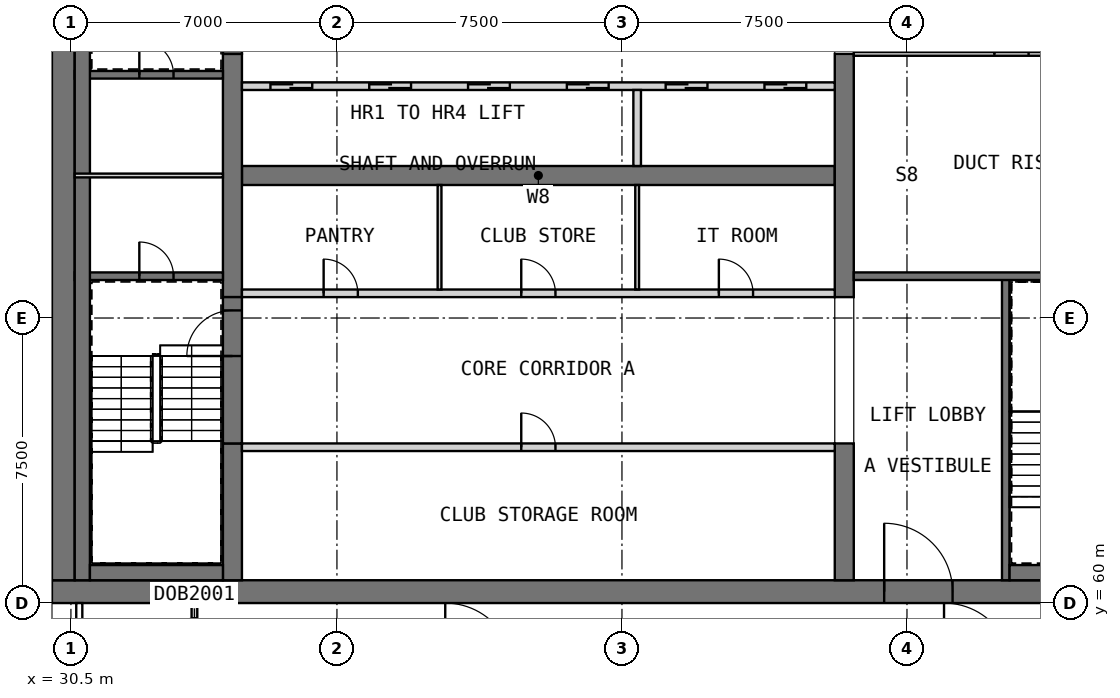
"""IFC4 building model, lengths in metres.
Left out: names, types, materials, properties, quantities, classifications, styles, units other than length and angle.
Written with IfcOpenShell. Run it as: python <this file> out.ifc"""

import sys

from ifc_helpers import new_model, si_unit, direction, frame, frame_2d, origin, place, context, subcontext, project, spatial, rectangle, extrude, element, fill, save


model = new_model("IFC4")
c1 = context("Model", 3, precision=1e-05, world=origin(), true_north=direction((0.0, 1.0)))
c2 = subcontext(c1, "Body", "Model", "MODEL_VIEW")
j1 = project(units=[si_unit("LENGTHUNIT", "METRE"), si_unit("PLANEANGLEUNIT", "RADIAN")], contexts=[c1])
p1 = place(None, origin())
s1 = spatial("IfcSite", under=j1, at=p1, CompositionType="ELEMENT")
p2 = place(p1, origin())
s2 = spatial("IfcBuilding", under=s1, at=p2, CompositionType="ELEMENT")
p3 = place(p2, frame((0.0, 0.0, 308.7)))
s3 = spatial("IfcBuildingStorey", under=s2, at=p3, CompositionType="ELEMENT", Elevation=308.7)
p4 = place(p3, frame((30.0, 60.3, 0.0), z_axis=(0.0, 0.0, 1.0), x_axis=(1.0, 0.0, 0.0)))
e1 = element("IfcWall", 1, at=p4, inside=s3, PredefinedType="SHEAR", context=c2, shape_type="SweptSolid", body=[
    extrude(rectangle(XDim=30.0, YDim=0.6, at=frame_2d((15.0, 0.0))), origin(), (0.0, 0.0, 1.0), 6.0),
])
p5 = place(p4, frame((21.9, 0.0, 0.0)))
e2 = element("IfcOpeningElement", 2, at=p5, cuts=e1, PredefinedType="OPENING", context=c2, shape_type="SweptSolid", body=[
    extrude(rectangle(XDim=1.8, YDim=2.1, at=frame_2d((0.9, 1.05))), frame((0.0, 0.31, 0.0), z_axis=(0.0, -1.0, 0.0), x_axis=(1.0, 0.0, 0.0)), (0.0, 0.0, 1.0), 0.62),
])
p6 = place(p4, frame((26.5, 0.0, 0.0)))
e3 = element("IfcOpeningElement", 3, at=p6, cuts=e1, PredefinedType="OPENING", context=c2, shape_type="SweptSolid", body=[
    extrude(rectangle(XDim=1.2, YDim=2.1, at=frame_2d((0.6, 1.05))), frame((0.0, 0.31, 0.0), z_axis=(0.0, -1.0, 0.0), x_axis=(1.0, 0.0, 0.0)), (0.0, 0.0, 1.0), 0.62),
])
p7 = place(p3, frame((30.3, 60.6, 0.0), z_axis=(0.0, 0.0, 1.0), x_axis=(0.0, 1.0, 0.0)))
e4 = element("IfcWall", 4, at=p7, inside=s3, PredefinedType="SHEAR", context=c2, shape_type="SweptSolid", body=[
    extrude(rectangle(XDim=21.3, YDim=0.6, at=frame_2d((10.65, 0.0))), origin(), (0.0, 0.0, 1.0), 6.0),
])
p8 = place(p3, frame((35.0, 71.25, 0.0), z_axis=(0.0, 0.0, 1.0), x_axis=(1.0, 0.0, 0.0)))
e5 = element("IfcWall", 5, at=p8, inside=s3, PredefinedType="SHEAR", context=c2, shape_type="SweptSolid", body=[
    extrude(rectangle(XDim=15.6, YDim=0.5, at=frame_2d((7.8, 0.0))), origin(), (0.0, 0.0, 1.0), 6.0),
])
p9 = place(p3, frame((34.75, 60.6, 0.0), z_axis=(0.0, 0.0, 1.0), x_axis=(0.0, 1.0, 0.0)))
e6 = element("IfcWall", 6, at=p9, inside=s3, PredefinedType="SHEAR", context=c2, shape_type="SweptSolid", body=[
    extrude(rectangle(XDim=3.6, YDim=0.5, at=frame_2d((1.8, 0.0))), origin(), (0.0, 0.0, 1.0), 6.0),
])
p10 = place(p3, frame((34.75, 68.05, 0.0), z_axis=(0.0, 0.0, 1.0), x_axis=(0.0, 1.0, 0.0)))
e7 = element("IfcWall", 7, at=p10, inside=s3, PredefinedType="SHEAR", context=c2, shape_type="SweptSolid", body=[
    extrude(rectangle(XDim=6.4, YDim=0.5, at=frame_2d((3.2, 0.0))), origin(), (0.0, 0.0, 1.0), 6.0),
])
p11 = place(p3, frame((50.85, 60.6, 0.0), z_axis=(0.0, 0.0, 1.0), x_axis=(0.0, 1.0, 0.0)))
e8 = element("IfcWall", 8, at=p11, inside=s3, PredefinedType="SHEAR", context=c2, shape_type="SweptSolid", body=[
    extrude(rectangle(XDim=3.6, YDim=0.5, at=frame_2d((1.8, 0.0))), origin(), (0.0, 0.0, 1.0), 6.0),
])
p12 = place(p3, frame((50.85, 68.05, 0.0), z_axis=(0.0, 0.0, 1.0), x_axis=(0.0, 1.0, 0.0)))
e9 = element("IfcWall", 9, at=p12, inside=s3, PredefinedType="SHEAR", context=c2, shape_type="SweptSolid", body=[
    extrude(rectangle(XDim=6.4, YDim=0.5, at=frame_2d((3.2, 0.0))), origin(), (0.0, 0.0, 1.0), 6.0),
])
p13 = place(p3, frame((35.0, 64.1, 0.0), z_axis=(0.0, 0.0, 1.0), x_axis=(1.0, 0.0, 0.0)))
e10 = element("IfcWall", 10, at=p13, inside=s3, PredefinedType="PARTITIONING", context=c2, shape_type="SweptSolid", body=[
    extrude(rectangle(XDim=15.6, YDim=0.2, at=frame_2d((7.8, 0.0))), origin(), (0.0, 0.0, 1.0), 5.59),
])
p14 = place(p13, frame((7.35, 0.0, 0.0)))
e11 = element("IfcOpeningElement", 11, at=p14, cuts=e10, PredefinedType="OPENING", context=c2, shape_type="SweptSolid", body=[
    extrude(rectangle(XDim=0.9, YDim=2.1, at=frame_2d((0.45, 1.05))), frame((0.0, 0.11, 0.0), z_axis=(0.0, -1.0, 0.0), x_axis=(1.0, 0.0, 0.0)), (0.0, 0.0, 1.0), 0.22),
])
p15 = place(p3, frame((35.0, 68.15, 0.0), z_axis=(0.0, 0.0, 1.0), x_axis=(1.0, 0.0, 0.0)))
e12 = element("IfcWall", 12, at=p15, inside=s3, PredefinedType="PARTITIONING", context=c2, shape_type="SweptSolid", body=[
    extrude(rectangle(XDim=15.6, YDim=0.2, at=frame_2d((7.8, 0.0))), origin(), (0.0, 0.0, 1.0), 5.59),
])
p16 = place(p15, frame((2.15, 0.0, 0.0)))
e13 = element("IfcOpeningElement", 13, at=p16, cuts=e12, PredefinedType="OPENING", context=c2, shape_type="SweptSolid", body=[
    extrude(rectangle(XDim=0.9, YDim=2.1, at=frame_2d((0.45, 1.05))), frame((0.0, 0.11, 0.0), z_axis=(0.0, -1.0, 0.0), x_axis=(1.0, 0.0, 0.0)), (0.0, 0.0, 1.0), 0.22),
])
p17 = place(p15, frame((7.35, 0.0, 0.0)))
e14 = element("IfcOpeningElement", 14, at=p17, cuts=e12, PredefinedType="OPENING", context=c2, shape_type="SweptSolid", body=[
    extrude(rectangle(XDim=0.9, YDim=2.1, at=frame_2d((0.45, 1.05))), frame((0.0, 0.11, 0.0), z_axis=(0.0, -1.0, 0.0), x_axis=(1.0, 0.0, 0.0)), (0.0, 0.0, 1.0), 0.22),
])
p18 = place(p15, frame((12.55, 0.0, 0.0)))
e15 = element("IfcOpeningElement", 15, at=p18, cuts=e12, PredefinedType="OPENING", context=c2, shape_type="SweptSolid", body=[
    extrude(rectangle(XDim=0.9, YDim=2.1, at=frame_2d((0.45, 1.05))), frame((0.0, 0.11, 0.0), z_axis=(0.0, -1.0, 0.0), x_axis=(1.0, 0.0, 0.0)), (0.0, 0.0, 1.0), 0.22),
])
for number, where, z_axis, x_axis in (
    (16, (40.2, 68.25, 0.0), (0.0, 0.0, 1.0), (0.0, 1.0, 0.0)),
    (17, (45.4, 68.25, 0.0), (0.0, 0.0, 1.0), (0.0, 1.0, 0.0)),
):
    element("IfcWall", number, at=place(p3, frame(where, z_axis=z_axis, x_axis=x_axis)), inside=s3, PredefinedType="PARTITIONING", context=c2, shape_type="SweptSolid", body=[
        extrude(rectangle(XDim=2.75, YDim=0.1, at=frame_2d((1.375, 0.0))), origin(), (0.0, 0.0, 1.0), 5.59),
    ])
p19 = place(p3, frame((35.0, 73.6, 0.0), z_axis=(0.0, 0.0, 1.0), x_axis=(1.0, 0.0, 0.0)))
e18 = element("IfcWall", 18, at=p19, inside=s3, PredefinedType="SOLIDWALL", context=c2, shape_type="SweptSolid", body=[
    extrude(rectangle(XDim=15.6, YDim=0.2, at=frame_2d((7.8, 0.0))), origin(), (0.0, 0.0, 1.0), 6.0),
])
p20 = place(p19, frame((0.75, 0.0, 0.0)))
e19 = element("IfcOpeningElement", 19, at=p20, cuts=e18, PredefinedType="OPENING", context=c2, shape_type="SweptSolid", body=[
    extrude(rectangle(XDim=1.1, YDim=2.1, at=frame_2d((0.55, 1.05))), frame((0.0, 0.11, 0.0), z_axis=(0.0, -1.0, 0.0), x_axis=(1.0, 0.0, 0.0)), (0.0, 0.0, 1.0), 0.22),
])
p21 = place(p19, frame((3.35, 0.0, 0.0)))
e20 = element("IfcOpeningElement", 20, at=p21, cuts=e18, PredefinedType="OPENING", context=c2, shape_type="SweptSolid", body=[
    extrude(rectangle(XDim=1.1, YDim=2.1, at=frame_2d((0.55, 1.05))), frame((0.0, 0.11, 0.0), z_axis=(0.0, -1.0, 0.0), x_axis=(1.0, 0.0, 0.0)), (0.0, 0.0, 1.0), 0.22),
])
p22 = place(p19, frame((5.95, 0.0, 0.0)))
e21 = element("IfcOpeningElement", 21, at=p22, cuts=e18, PredefinedType="OPENING", context=c2, shape_type="SweptSolid", body=[
    extrude(rectangle(XDim=1.1, YDim=2.1, at=frame_2d((0.55, 1.05))), frame((0.0, 0.11, 0.0), z_axis=(0.0, -1.0, 0.0), x_axis=(1.0, 0.0, 0.0)), (0.0, 0.0, 1.0), 0.22),
])
p23 = place(p19, frame((8.55, 0.0, 0.0)))
e22 = element("IfcOpeningElement", 22, at=p23, cuts=e18, PredefinedType="OPENING", context=c2, shape_type="SweptSolid", body=[
    extrude(rectangle(XDim=1.1, YDim=2.1, at=frame_2d((0.55, 1.05))), frame((0.0, 0.11, 0.0), z_axis=(0.0, -1.0, 0.0), x_axis=(1.0, 0.0, 0.0)), (0.0, 0.0, 1.0), 0.22),
])
p24 = place(p19, frame((11.15, 0.0, 0.0)))
e23 = element("IfcOpeningElement", 23, at=p24, cuts=e18, PredefinedType="OPENING", context=c2, shape_type="SweptSolid", body=[
    extrude(rectangle(XDim=1.1, YDim=2.1, at=frame_2d((0.55, 1.05))), frame((0.0, 0.11, 0.0), z_axis=(0.0, -1.0, 0.0), x_axis=(1.0, 0.0, 0.0)), (0.0, 0.0, 1.0), 0.22),
])
p25 = place(p19, frame((13.75, 0.0, 0.0)))
e24 = element("IfcOpeningElement", 24, at=p25, cuts=e18, PredefinedType="OPENING", context=c2, shape_type="SweptSolid", body=[
    extrude(rectangle(XDim=1.1, YDim=2.1, at=frame_2d((0.55, 1.05))), frame((0.0, 0.11, 0.0), z_axis=(0.0, -1.0, 0.0), x_axis=(1.0, 0.0, 0.0)), (0.0, 0.0, 1.0), 0.22),
])
p26 = place(p3, frame((45.4, 71.5, 0.0), z_axis=(0.0, 0.0, 1.0), x_axis=(0.0, 1.0, 0.0)))
e25 = element("IfcWall", 25, at=p26, inside=s3, PredefinedType="SOLIDWALL", context=c2, shape_type="SweptSolid", body=[
    extrude(rectangle(XDim=2.0, YDim=0.2, at=frame_2d((1.0, 0.0))), origin(), (0.0, 0.0, 1.0), 6.0),
])
p27 = place(p3, frame((34.75, 64.2, 0.0), z_axis=(0.0, 0.0, 1.0), x_axis=(0.0, 1.0, 0.0)))
e26 = element("IfcWall", 26, at=p27, inside=s3, PredefinedType="SOLIDWALL", context=c2, shape_type="SweptSolid", body=[
    extrude(rectangle(XDim=3.85, YDim=0.5, at=frame_2d((1.925, 0.0))), origin(), (0.0, 0.0, 1.0), 4.8),
])
p28 = place(p27, frame((2.3, 0.0, 0.0)))
e27 = element("IfcOpeningElement", 27, at=p28, cuts=e26, PredefinedType="OPENING", context=c2, shape_type="SweptSolid", body=[
    extrude(rectangle(XDim=1.2, YDim=2.1, at=frame_2d((0.6, 1.05))), frame((0.0, 0.26, 0.0), z_axis=(0.0, -1.0, 0.0), x_axis=(1.0, 0.0, 0.0)), (0.0, 0.0, 1.0), 0.52),
])
p29 = place(p3, frame((34.75, 74.45, 0.0), z_axis=(0.0, 0.0, 1.0), x_axis=(0.0, 1.0, 0.0)))
e28 = element("IfcWall", 28, at=p29, inside=s3, PredefinedType="SOLIDWALL", context=c2, shape_type="SweptSolid", body=[
    extrude(rectangle(XDim=3.85, YDim=0.5, at=frame_2d((1.925, 0.0))), origin(), (0.0, 0.0, 1.0), 4.8),
])
p30 = place(p29, frame((1.0, 0.0, 0.0)))
e29 = element("IfcOpeningElement", 29, at=p30, cuts=e28, PredefinedType="OPENING", context=c2, shape_type="SweptSolid", body=[
    extrude(rectangle(XDim=1.2, YDim=2.1, at=frame_2d((0.6, 1.05))), frame((0.0, 0.26, 0.0), z_axis=(0.0, -1.0, 0.0), x_axis=(1.0, 0.0, 0.0)), (0.0, 0.0, 1.0), 0.52),
])
p31 = place(p3, frame((30.6, 68.6, 0.0), z_axis=(0.0, 0.0, 1.0), x_axis=(1.0, 0.0, 0.0)))
e30 = element("IfcWall", 30, at=p31, inside=s3, PredefinedType="SOLIDWALL", context=c2, shape_type="SweptSolid", body=[
    extrude(rectangle(XDim=3.9, YDim=0.2, at=frame_2d((1.95, 0.0))), origin(), (0.0, 0.0, 1.0), 5.59),
])
p32 = place(p31, frame((1.7, 0.0, 0.0)))
e31 = element("IfcOpeningElement", 31, at=p32, cuts=e30, PredefinedType="OPENING", context=c2, shape_type="SweptSolid", body=[
    extrude(rectangle(XDim=0.9, YDim=2.1, at=frame_2d((0.45, 1.05))), frame((0.0, 0.11, 0.0), z_axis=(0.0, -1.0, 0.0), x_axis=(1.0, 0.0, 0.0)), (0.0, 0.0, 1.0), 0.22),
])
p33 = place(p3, frame((30.6, 73.9, 0.0), z_axis=(0.0, 0.0, 1.0), x_axis=(1.0, 0.0, 0.0)))
e32 = element("IfcWall", 32, at=p33, inside=s3, PredefinedType="SOLIDWALL", context=c2, shape_type="SweptSolid", body=[
    extrude(rectangle(XDim=3.9, YDim=0.2, at=frame_2d((1.95, 0.0))), origin(), (0.0, 0.0, 1.0), 5.59),
])
p34 = place(p33, frame((1.7, 0.0, 0.0)))
e33 = element("IfcOpeningElement", 33, at=p34, cuts=e32, PredefinedType="OPENING", context=c2, shape_type="SweptSolid", body=[
    extrude(rectangle(XDim=0.9, YDim=2.1, at=frame_2d((0.45, 1.05))), frame((0.0, 0.11, 0.0), z_axis=(0.0, -1.0, 0.0), x_axis=(1.0, 0.0, 0.0)), (0.0, 0.0, 1.0), 0.22),
])
p35 = place(p3, frame((55.1, 60.6, 0.0), z_axis=(0.0, 0.0, 1.0), x_axis=(0.0, 1.0, 0.0)))
e34 = element("IfcWall", 34, at=p35, inside=s3, PredefinedType="SOLIDWALL", context=c2, shape_type="SweptSolid", body=[
    extrude(rectangle(XDim=8.0, YDim=0.2, at=frame_2d((4.0, 0.0))), origin(), (0.0, 0.0, 1.0), 5.59),
])
p36 = place(p3, frame((51.1, 68.6, 0.0), z_axis=(0.0, 0.0, 1.0), x_axis=(1.0, 0.0, 0.0)))
e35 = element("IfcWall", 35, at=p36, inside=s3, PredefinedType="SOLIDWALL", context=c2, shape_type="SweptSolid", body=[
    extrude(rectangle(XDim=8.3, YDim=0.2, at=frame_2d((4.15, 0.0))), origin(), (0.0, 0.0, 1.0), 5.59),
])
p37 = place(p3, frame((30.8, 60.6, 0.0), z_axis=(0.0, 0.0, 1.0), x_axis=(0.0, 1.0, 0.0)))
e36 = element("IfcWall", 36, at=p37, inside=s3, PredefinedType="SOLIDWALL", context=c2, shape_type="SweptSolid", body=[
    extrude(rectangle(XDim=21.3, YDim=0.4, at=frame_2d((10.65, 0.0))), origin(), (0.0, 0.0, 1.0), 5.59),
])
p38 = place(p3, frame((31.0, 60.8, 0.0), z_axis=(0.0, 0.0, 1.0), x_axis=(1.0, 0.0, 0.0)))
e37 = element("IfcWall", 37, at=p38, inside=s3, PredefinedType="SOLIDWALL", context=c2, shape_type="SweptSolid", body=[
    extrude(rectangle(XDim=3.5, YDim=0.4, at=frame_2d((1.75, 0.0))), origin(), (0.0, 0.0, 1.0), 5.59),
])
p39 = place(p3, frame((55.2, 60.8, 0.0), z_axis=(0.0, 0.0, 1.0), x_axis=(1.0, 0.0, 0.0)))
e38 = element("IfcWall", 38, at=p39, inside=s3, PredefinedType="SOLIDWALL", context=c2, shape_type="SweptSolid", body=[
    extrude(rectangle(XDim=1.3, YDim=0.4, at=frame_2d((0.65, 0.0))), origin(), (0.0, 0.0, 1.0), 5.59),
])
p40 = place(p3, frame((30.6, 71.25, 0.0), z_axis=(0.0, 0.0, 1.0), x_axis=(1.0, 0.0, 0.0)))
e39 = element("IfcWall", 39, at=p40, inside=s3, PredefinedType="PARTITIONING", context=c2, shape_type="SweptSolid", body=[
    extrude(rectangle(XDim=3.9, YDim=0.1, at=frame_2d((1.95, 0.0))), origin(), (0.0, 0.0, 1.0), 5.59),
])
p41 = place(p3, frame((51.1, 74.45, 0.0), z_axis=(0.0, 0.0, 1.0), x_axis=(1.0, 0.0, 0.0)))
e40 = element("IfcWall", 40, at=p41, inside=s3, PredefinedType="PARTITIONING", context=c2, shape_type="SweptSolid", body=[
    extrude(rectangle(XDim=8.3, YDim=0.1, at=frame_2d((4.15, 0.0))), origin(), (0.0, 0.0, 1.0), 5.59),
])
p42 = place(p41, frame((3.7, 0.0, 0.0)))
e41 = element("IfcOpeningElement", 41, at=p42, cuts=e40, PredefinedType="OPENING", context=c2, shape_type="SweptSolid", body=[
    extrude(rectangle(XDim=0.9, YDim=2.1, at=frame_2d((0.45, 1.05))), frame((0.0, 0.06, 0.0), z_axis=(0.0, -1.0, 0.0), x_axis=(1.0, 0.0, 0.0)), (0.0, 0.0, 1.0), 0.12),
])
p43 = place(p3, frame((33.75, 58.275, 0.0), z_axis=(0.0, 0.0, 1.0), x_axis=(0.0, 1.0, 0.0)))
e42 = element("IfcWall", 42, at=p43, inside=s3, PredefinedType="PARTITIONING", context=c2, shape_type="SweptSolid", body=[
    extrude(rectangle(XDim=1.725, YDim=0.15, at=frame_2d((0.863, 0.0))), origin(), (0.0, 0.0, 1.0), 5.6),
])
p44 = place(p43, frame((0.325, 0.0, 0.0)))
e43 = element("IfcOpeningElement", 43, at=p44, cuts=e42, PredefinedType="OPENING", context=c2, shape_type="SweptSolid", body=[
    extrude(rectangle(XDim=1.0, YDim=2.1, at=frame_2d((0.5, 1.05))), frame((0.0, 0.085, 0.0), z_axis=(0.0, -1.0, 0.0), x_axis=(1.0, 0.0, 0.0)), (0.0, 0.0, 1.0), 0.17),
])
p45 = place(p14, origin())
e44 = element("IfcDoor", 44, at=p45, inside=s3, OperationType="SINGLE_SWING_RIGHT", PredefinedType="DOOR", context=c2, shape_type="SweptSolid", body=[
    extrude(rectangle(XDim=0.9, YDim=2.1, at=frame_2d((0.45, 1.05))), frame((0.0, 0.025, 0.0), z_axis=(0.0, -1.0, 0.0), x_axis=(1.0, 0.0, 0.0)), (0.0, 0.0, 1.0), 0.05),
])
fill(e11, e44)
p46 = place(p16, origin())
e45 = element("IfcDoor", 45, at=p46, inside=s3, OperationType="SINGLE_SWING_RIGHT", PredefinedType="DOOR", context=c2, shape_type="SweptSolid", body=[
    extrude(rectangle(XDim=0.9, YDim=2.1, at=frame_2d((0.45, 1.05))), frame((0.0, 0.025, 0.0), z_axis=(0.0, -1.0, 0.0), x_axis=(1.0, 0.0, 0.0)), (0.0, 0.0, 1.0), 0.05),
])
fill(e13, e45)
p47 = place(p17, origin())
e46 = element("IfcDoor", 46, at=p47, inside=s3, OperationType="SINGLE_SWING_LEFT", PredefinedType="DOOR", context=c2, shape_type="SweptSolid", body=[
    extrude(rectangle(XDim=0.9, YDim=2.1, at=frame_2d((0.45, 1.05))), frame((0.0, 0.025, 0.0), z_axis=(0.0, -1.0, 0.0), x_axis=(1.0, 0.0, 0.0)), (0.0, 0.0, 1.0), 0.05),
])
fill(e14, e46)
p48 = place(p18, origin())
e47 = element("IfcDoor", 47, at=p48, inside=s3, OperationType="SINGLE_SWING_RIGHT", PredefinedType="DOOR", context=c2, shape_type="SweptSolid", body=[
    extrude(rectangle(XDim=0.9, YDim=2.1, at=frame_2d((0.45, 1.05))), frame((0.0, 0.025, 0.0), z_axis=(0.0, -1.0, 0.0), x_axis=(1.0, 0.0, 0.0)), (0.0, 0.0, 1.0), 0.05),
])
fill(e15, e47)
p49 = place(p20, origin())
e48 = element("IfcDoor", 48, at=p49, inside=s3, OperationType="DOUBLE_DOOR_SLIDING", PredefinedType="DOOR", context=c2, shape_type="SweptSolid", body=[
    extrude(rectangle(XDim=1.1, YDim=2.1, at=frame_2d((0.55, 1.05))), frame((0.0, 0.025, 0.0), z_axis=(0.0, -1.0, 0.0), x_axis=(1.0, 0.0, 0.0)), (0.0, 0.0, 1.0), 0.05),
])
fill(e19, e48)
p50 = place(p21, origin())
e49 = element("IfcDoor", 49, at=p50, inside=s3, OperationType="DOUBLE_DOOR_SLIDING", PredefinedType="DOOR", context=c2, shape_type="SweptSolid", body=[
    extrude(rectangle(XDim=1.1, YDim=2.1, at=frame_2d((0.55, 1.05))), frame((0.0, 0.025, 0.0), z_axis=(0.0, -1.0, 0.0), x_axis=(1.0, 0.0, 0.0)), (0.0, 0.0, 1.0), 0.05),
])
fill(e20, e49)
p51 = place(p22, origin())
e50 = element("IfcDoor", 50, at=p51, inside=s3, OperationType="DOUBLE_DOOR_SLIDING", PredefinedType="DOOR", context=c2, shape_type="SweptSolid", body=[
    extrude(rectangle(XDim=1.1, YDim=2.1, at=frame_2d((0.55, 1.05))), frame((0.0, 0.025, 0.0), z_axis=(0.0, -1.0, 0.0), x_axis=(1.0, 0.0, 0.0)), (0.0, 0.0, 1.0), 0.05),
])
fill(e21, e50)
p52 = place(p23, origin())
e51 = element("IfcDoor", 51, at=p52, inside=s3, OperationType="DOUBLE_DOOR_SLIDING", PredefinedType="DOOR", context=c2, shape_type="SweptSolid", body=[
    extrude(rectangle(XDim=1.1, YDim=2.1, at=frame_2d((0.55, 1.05))), frame((0.0, 0.025, 0.0), z_axis=(0.0, -1.0, 0.0), x_axis=(1.0, 0.0, 0.0)), (0.0, 0.0, 1.0), 0.05),
])
fill(e22, e51)
p53 = place(p24, origin())
e52 = element("IfcDoor", 52, at=p53, inside=s3, OperationType="DOUBLE_DOOR_SLIDING", PredefinedType="DOOR", context=c2, shape_type="SweptSolid", body=[
    extrude(rectangle(XDim=1.1, YDim=2.1, at=frame_2d((0.55, 1.05))), frame((0.0, 0.025, 0.0), z_axis=(0.0, -1.0, 0.0), x_axis=(1.0, 0.0, 0.0)), (0.0, 0.0, 1.0), 0.05),
])
fill(e23, e52)
p54 = place(p25, origin())
e53 = element("IfcDoor", 53, at=p54, inside=s3, OperationType="DOUBLE_DOOR_SLIDING", PredefinedType="DOOR", context=c2, shape_type="SweptSolid", body=[
    extrude(rectangle(XDim=1.1, YDim=2.1, at=frame_2d((0.55, 1.05))), frame((0.0, 0.025, 0.0), z_axis=(0.0, -1.0, 0.0), x_axis=(1.0, 0.0, 0.0)), (0.0, 0.0, 1.0), 0.05),
])
fill(e24, e53)
p55 = place(p5, origin())
e54 = element("IfcDoor", 54, at=p55, inside=s3, OperationType="DOUBLE_DOOR_SINGLE_SWING", PredefinedType="DOOR", context=c2, shape_type="SweptSolid", body=[
    extrude(rectangle(XDim=1.8, YDim=2.1, at=frame_2d((0.9, 1.05))), frame((0.0, 0.025, 0.0), z_axis=(0.0, -1.0, 0.0), x_axis=(1.0, 0.0, 0.0)), (0.0, 0.0, 1.0), 0.05),
])
fill(e2, e54)
p56 = place(p28, origin())
e55 = element("IfcDoor", 55, at=p56, inside=s3, OperationType="SINGLE_SWING_LEFT", PredefinedType="DOOR", context=c2, shape_type="SweptSolid", body=[
    extrude(rectangle(XDim=1.2, YDim=2.1, at=frame_2d((0.6, 1.05))), frame((0.0, 0.025, 0.0), z_axis=(0.0, -1.0, 0.0), x_axis=(1.0, 0.0, 0.0)), (0.0, 0.0, 1.0), 0.05),
])
fill(e27, e55)
p57 = place(p32, origin())
e56 = element("IfcDoor", 56, at=p57, inside=s3, OperationType="SINGLE_SWING_LEFT", PredefinedType="DOOR", context=c2, shape_type="SweptSolid", body=[
    extrude(rectangle(XDim=0.9, YDim=2.1, at=frame_2d((0.45, 1.05))), frame((0.0, 0.025, 0.0), z_axis=(0.0, -1.0, 0.0), x_axis=(1.0, 0.0, 0.0)), (0.0, 0.0, 1.0), 0.05),
])
fill(e31, e56)
p58 = place(p34, origin())
e57 = element("IfcDoor", 57, at=p58, inside=s3, OperationType="SINGLE_SWING_RIGHT", PredefinedType="DOOR", context=c2, shape_type="SweptSolid", body=[
    extrude(rectangle(XDim=0.9, YDim=2.1, at=frame_2d((0.45, 1.05))), frame((0.0, 0.025, 0.0), z_axis=(0.0, -1.0, 0.0), x_axis=(1.0, 0.0, 0.0)), (0.0, 0.0, 1.0), 0.05),
])
fill(e33, e57)
p59 = place(p42, origin())
e58 = element("IfcDoor", 58, at=p59, inside=s3, OperationType="SINGLE_SWING_RIGHT", PredefinedType="DOOR", context=c2, shape_type="SweptSolid", body=[
    extrude(rectangle(XDim=0.9, YDim=2.1, at=frame_2d((0.45, 1.05))), frame((0.0, 0.025, 0.0), z_axis=(0.0, -1.0, 0.0), x_axis=(1.0, 0.0, 0.0)), (0.0, 0.0, 1.0), 0.05),
])
fill(e41, e58)
save(model, sys.argv[1])
